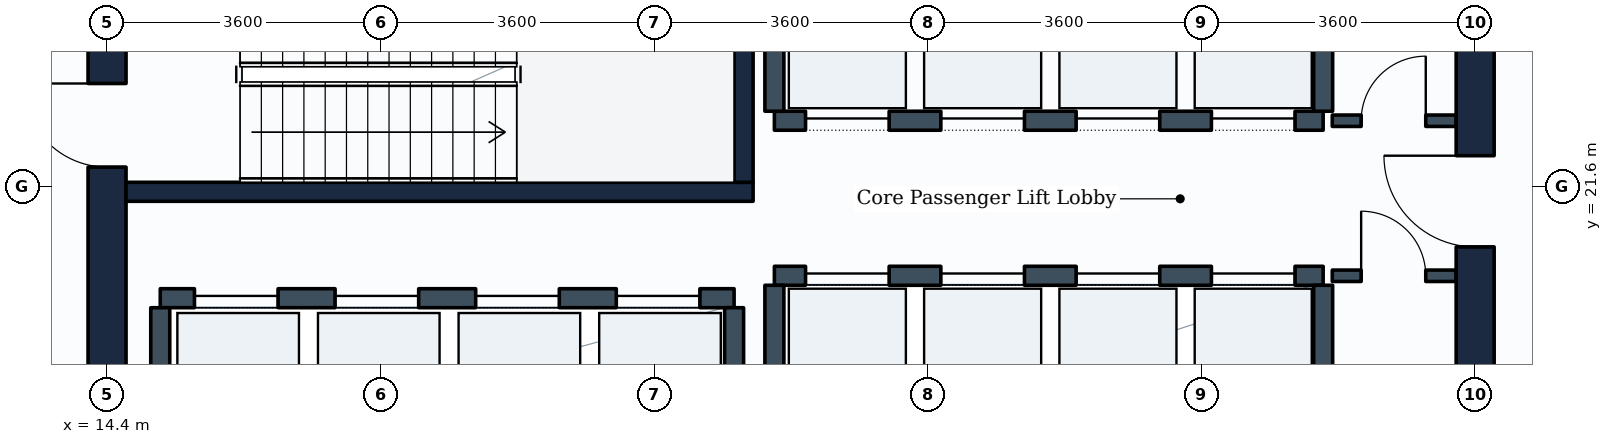
"""IFC4 building model, lengths in metres.
Left out: names, types, materials, properties, quantities, classifications, styles, units other than length and angle.
Written with IfcOpenShell. Run it as: python <this file> out.ifc"""

import sys

from ifc_helpers import new_model, si_unit, direction, frame, frame_2d, origin, place, context, subcontext, project, spatial, rectangle, extrude, element, fill, save


model = new_model("IFC4")
c1 = context("Model", 3, precision=1e-05, world=origin(), true_north=direction((0.0, 1.0)))
c2 = subcontext(c1, "Body", "Model", "MODEL_VIEW")
j1 = project(units=[si_unit("LENGTHUNIT", "METRE"), si_unit("PLANEANGLEUNIT", "RADIAN")], contexts=[c1])
p1 = place(None, origin())
s1 = spatial("IfcSite", under=j1, at=p1, CompositionType="ELEMENT")
p2 = place(p1, origin())
s2 = spatial("IfcBuilding", under=s1, at=p2, CompositionType="ELEMENT")
p3 = place(p2, frame((0.0, 0.0, 115.2)))
s3 = spatial("IfcBuildingStorey", under=s2, at=p3, CompositionType="ELEMENT", Elevation=115.2)
p4 = place(p3, frame((14.4, 10.8, 0.0), z_axis=(0.0, 0.0, 1.0), x_axis=(0.0, 1.0, 0.0)))
e1 = element("IfcWall", 1, at=p4, inside=s3, PredefinedType="SHEAR", context=c2, shape_type="SweptSolid", body=[
    extrude(rectangle(XDim=14.4, YDim=0.5, at=frame_2d((7.2, 0.0))), origin(), (0.0, 0.0, 1.0), 4.55),
])
p5 = place(p4, frame((11.05, 0.0, 0.0)))
e2 = element("IfcOpeningElement", 2, at=p5, cuts=e1, PredefinedType="OPENING", context=c2, shape_type="SweptSolid", body=[
    extrude(rectangle(XDim=1.1, YDim=2.1, at=frame_2d((0.55, 1.05))), frame((0.0, 0.26, 0.0), z_axis=(0.0, -1.0, 0.0), x_axis=(1.0, 0.0, 0.0)), (0.0, 0.0, 1.0), 0.52),
])
p6 = place(p4, frame((4.9, 0.0, 0.0)))
e3 = element("IfcOpeningElement", 3, at=p6, cuts=e1, PredefinedType="OPENING", context=c2, shape_type="SweptSolid", body=[
    extrude(rectangle(XDim=1.2, YDim=2.1, at=frame_2d((0.6, 1.05))), frame((0.0, 0.26, 0.0), z_axis=(0.0, -1.0, 0.0), x_axis=(1.0, 0.0, 0.0)), (0.0, 0.0, 1.0), 0.52),
])
p7 = place(p3, frame((32.4, 10.8, 0.0), z_axis=(0.0, 0.0, 1.0), x_axis=(0.0, 1.0, 0.0)))
e4 = element("IfcWall", 4, at=p7, inside=s3, PredefinedType="SHEAR", context=c2, shape_type="SweptSolid", body=[
    extrude(rectangle(XDim=14.4, YDim=0.5, at=frame_2d((7.2, 0.0))), origin(), (0.0, 0.0, 1.0), 4.55),
])
p8 = place(p7, frame((4.35, 0.0, 0.0)))
e5 = element("IfcOpeningElement", 5, at=p8, cuts=e4, PredefinedType="OPENING", context=c2, shape_type="SweptSolid", body=[
    extrude(rectangle(XDim=1.2, YDim=2.1, at=frame_2d((0.6, 1.05))), frame((0.0, 0.26, 0.0), z_axis=(0.0, -1.0, 0.0), x_axis=(1.0, 0.0, 0.0)), (0.0, 0.0, 1.0), 0.52),
])
p9 = place(p7, frame((10.0, 0.0, 0.0)))
e6 = element("IfcOpeningElement", 6, at=p9, cuts=e4, PredefinedType="OPENING", context=c2, shape_type="SweptSolid", body=[
    extrude(rectangle(XDim=1.2, YDim=2.1, at=frame_2d((0.6, 1.05))), frame((0.0, 0.26, 0.0), z_axis=(0.0, -1.0, 0.0), x_axis=(1.0, 0.0, 0.0)), (0.0, 0.0, 1.0), 0.52),
])
p10 = place(p3, frame((14.65, 21.525, 0.0), z_axis=(0.0, 0.0, 1.0), x_axis=(1.0, 0.0, 0.0)))
e7 = element("IfcWall", 7, at=p10, inside=s3, PredefinedType="SHEAR", context=c2, shape_type="SweptSolid", body=[
    extrude(rectangle(XDim=8.25, YDim=0.25, at=frame_2d((4.125, 0.0))), origin(), (0.0, 0.0, 1.0), 4.55),
])
p11 = place(p3, frame((22.775, 21.65, 0.0), z_axis=(0.0, 0.0, 1.0), x_axis=(0.0, 1.0, 0.0)))
e8 = element("IfcWall", 8, at=p11, inside=s3, PredefinedType="SHEAR", context=c2, shape_type="SweptSolid", body=[
    extrude(rectangle(XDim=2.84, YDim=0.25, at=frame_2d((1.42, 0.0))), origin(), (0.0, 0.0, 1.0), 4.55),
])
p12 = place(p3, frame((15.1, 20.125, 0.0), z_axis=(0.0, 0.0, 1.0), x_axis=(1.0, 0.0, 0.0)))
e9 = element("IfcWall", 9, at=p12, inside=s3, PredefinedType="PARTITIONING", context=c2, shape_type="SweptSolid", body=[
    extrude(rectangle(XDim=7.55, YDim=0.25, at=frame_2d((3.775, 0.0))), origin(), (0.0, 0.0, 1.0), 4.535),
])
p13 = place(p12, frame((0.45, 0.0, 0.0)))
e10 = element("IfcOpeningElement", 10, at=p13, cuts=e9, PredefinedType="OPENING", context=c2, shape_type="SweptSolid", body=[
    extrude(rectangle(XDim=1.1, YDim=2.1, at=frame_2d((0.55, 1.05))), frame((0.0, 0.135, 0.0), z_axis=(0.0, -1.0, 0.0), x_axis=(1.0, 0.0, 0.0)), (0.0, 0.0, 1.0), 0.27),
])
p14 = place(p12, frame((2.3, 0.0, 0.0)))
e11 = element("IfcOpeningElement", 11, at=p14, cuts=e9, PredefinedType="OPENING", context=c2, shape_type="SweptSolid", body=[
    extrude(rectangle(XDim=1.1, YDim=2.1, at=frame_2d((0.55, 1.05))), frame((0.0, 0.135, 0.0), z_axis=(0.0, -1.0, 0.0), x_axis=(1.0, 0.0, 0.0)), (0.0, 0.0, 1.0), 0.27),
])
p15 = place(p12, frame((4.15, 0.0, 0.0)))
e12 = element("IfcOpeningElement", 12, at=p15, cuts=e9, PredefinedType="OPENING", context=c2, shape_type="SweptSolid", body=[
    extrude(rectangle(XDim=1.1, YDim=2.1, at=frame_2d((0.55, 1.05))), frame((0.0, 0.135, 0.0), z_axis=(0.0, -1.0, 0.0), x_axis=(1.0, 0.0, 0.0)), (0.0, 0.0, 1.0), 0.27),
])
p16 = place(p12, frame((6.0, 0.0, 0.0)))
e13 = element("IfcOpeningElement", 13, at=p16, cuts=e9, PredefinedType="OPENING", context=c2, shape_type="SweptSolid", body=[
    extrude(rectangle(XDim=1.1, YDim=2.1, at=frame_2d((0.55, 1.05))), frame((0.0, 0.135, 0.0), z_axis=(0.0, -1.0, 0.0), x_axis=(1.0, 0.0, 0.0)), (0.0, 0.0, 1.0), 0.27),
])
for number, where, z_axis, x_axis in (
    (14, (15.1, 18.025, 0.0), (0.0, 0.0, 1.0), (0.0, 1.0, 0.0)),
    (15, (22.65, 18.025, 0.0), (0.0, 0.0, 1.0), (0.0, 1.0, 0.0)),
):
    element("IfcWall", number, at=place(p3, frame(where, z_axis=z_axis, x_axis=x_axis)), inside=s3, PredefinedType="PARTITIONING", context=c2, shape_type="SweptSolid", body=[
        extrude(rectangle(XDim=1.975, YDim=0.25, at=frame_2d((0.988, 0.0))), origin(), (0.0, 0.0, 1.0), 4.535),
    ])
p17 = place(p3, frame((23.18, 20.42, 0.0), z_axis=(0.0, 0.0, 1.0), x_axis=(1.0, 0.0, 0.0)))
e16 = element("IfcWall", 16, at=p17, inside=s3, PredefinedType="PARTITIONING", context=c2, shape_type="SweptSolid", body=[
    extrude(rectangle(XDim=7.22, YDim=0.25, at=frame_2d((3.61, 0.0))), origin(), (0.0, 0.0, 1.0), 4.535),
])
p18 = place(p17, frame((0.41, 0.0, 0.0)))
e17 = element("IfcOpeningElement", 17, at=p18, cuts=e16, PredefinedType="OPENING", context=c2, shape_type="SweptSolid", body=[
    extrude(rectangle(XDim=1.1, YDim=2.1, at=frame_2d((0.55, 1.05))), frame((0.0, 0.135, 0.0), z_axis=(0.0, -1.0, 0.0), x_axis=(1.0, 0.0, 0.0)), (0.0, 0.0, 1.0), 0.27),
])
p19 = place(p17, frame((2.19, 0.0, 0.0)))
e18 = element("IfcOpeningElement", 18, at=p19, cuts=e16, PredefinedType="OPENING", context=c2, shape_type="SweptSolid", body=[
    extrude(rectangle(XDim=1.1, YDim=2.1, at=frame_2d((0.55, 1.05))), frame((0.0, 0.135, 0.0), z_axis=(0.0, -1.0, 0.0), x_axis=(1.0, 0.0, 0.0)), (0.0, 0.0, 1.0), 0.27),
])
p20 = place(p17, frame((3.97, 0.0, 0.0)))
e19 = element("IfcOpeningElement", 19, at=p20, cuts=e16, PredefinedType="OPENING", context=c2, shape_type="SweptSolid", body=[
    extrude(rectangle(XDim=1.1, YDim=2.1, at=frame_2d((0.55, 1.05))), frame((0.0, 0.135, 0.0), z_axis=(0.0, -1.0, 0.0), x_axis=(1.0, 0.0, 0.0)), (0.0, 0.0, 1.0), 0.27),
])
p21 = place(p17, frame((5.75, 0.0, 0.0)))
e20 = element("IfcOpeningElement", 20, at=p21, cuts=e16, PredefinedType="OPENING", context=c2, shape_type="SweptSolid", body=[
    extrude(rectangle(XDim=1.1, YDim=2.1, at=frame_2d((0.55, 1.05))), frame((0.0, 0.135, 0.0), z_axis=(0.0, -1.0, 0.0), x_axis=(1.0, 0.0, 0.0)), (0.0, 0.0, 1.0), 0.27),
])
for number, where, z_axis, x_axis in (
    (21, (23.18, 18.025, 0.0), (0.0, 0.0, 1.0), (0.0, 1.0, 0.0)),
    (22, (30.4, 18.025, 0.0), (0.0, 0.0, 1.0), (0.0, 1.0, 0.0)),
):
    element("IfcWall", number, at=place(p3, frame(where, z_axis=z_axis, x_axis=x_axis)), inside=s3, PredefinedType="PARTITIONING", context=c2, shape_type="SweptSolid", body=[
        extrude(rectangle(XDim=2.27, YDim=0.25, at=frame_2d((1.135, 0.0))), origin(), (0.0, 0.0, 1.0), 4.535),
    ])
p22 = place(p3, frame((23.18, 22.46, 0.0), z_axis=(0.0, 0.0, 1.0), x_axis=(1.0, 0.0, 0.0)))
e23 = element("IfcWall", 23, at=p22, inside=s3, PredefinedType="PARTITIONING", context=c2, shape_type="SweptSolid", body=[
    extrude(rectangle(XDim=7.22, YDim=0.25, at=frame_2d((3.61, 0.0))), origin(), (0.0, 0.0, 1.0), 4.535),
])
p23 = place(p22, frame((0.41, 0.0, 0.0)))
e24 = element("IfcOpeningElement", 24, at=p23, cuts=e23, PredefinedType="OPENING", context=c2, shape_type="SweptSolid", body=[
    extrude(rectangle(XDim=1.1, YDim=2.1, at=frame_2d((0.55, 1.05))), frame((0.0, 0.135, 0.0), z_axis=(0.0, -1.0, 0.0), x_axis=(1.0, 0.0, 0.0)), (0.0, 0.0, 1.0), 0.27),
])
p24 = place(p22, frame((2.19, 0.0, 0.0)))
e25 = element("IfcOpeningElement", 25, at=p24, cuts=e23, PredefinedType="OPENING", context=c2, shape_type="SweptSolid", body=[
    extrude(rectangle(XDim=1.1, YDim=2.1, at=frame_2d((0.55, 1.05))), frame((0.0, 0.135, 0.0), z_axis=(0.0, -1.0, 0.0), x_axis=(1.0, 0.0, 0.0)), (0.0, 0.0, 1.0), 0.27),
])
p25 = place(p22, frame((3.97, 0.0, 0.0)))
e26 = element("IfcOpeningElement", 26, at=p25, cuts=e23, PredefinedType="OPENING", context=c2, shape_type="SweptSolid", body=[
    extrude(rectangle(XDim=1.1, YDim=2.1, at=frame_2d((0.55, 1.05))), frame((0.0, 0.135, 0.0), z_axis=(0.0, -1.0, 0.0), x_axis=(1.0, 0.0, 0.0)), (0.0, 0.0, 1.0), 0.27),
])
p26 = place(p22, frame((5.75, 0.0, 0.0)))
e27 = element("IfcOpeningElement", 27, at=p26, cuts=e23, PredefinedType="OPENING", context=c2, shape_type="SweptSolid", body=[
    extrude(rectangle(XDim=1.1, YDim=2.1, at=frame_2d((0.55, 1.05))), frame((0.0, 0.135, 0.0), z_axis=(0.0, -1.0, 0.0), x_axis=(1.0, 0.0, 0.0)), (0.0, 0.0, 1.0), 0.27),
])
for number, where, z_axis, x_axis in (
    (28, (23.18, 22.585, 0.0), (0.0, 0.0, 1.0), (0.0, 1.0, 0.0)),
    (29, (30.4, 22.585, 0.0), (0.0, 0.0, 1.0), (0.0, 1.0, 0.0)),
):
    element("IfcWall", number, at=place(p3, frame(where, z_axis=z_axis, x_axis=x_axis)), inside=s3, PredefinedType="PARTITIONING", context=c2, shape_type="SweptSolid", body=[
        extrude(rectangle(XDim=2.315, YDim=0.25, at=frame_2d((1.157, 0.0))), origin(), (0.0, 0.0, 1.0), 4.535),
    ])
p27 = place(p3, frame((30.52, 22.46, 0.0), z_axis=(0.0, 0.0, 1.0), x_axis=(1.0, 0.0, 0.0)))
e30 = element("IfcWall", 30, at=p27, inside=s3, PredefinedType="PARTITIONING", context=c2, shape_type="SweptSolid", body=[
    extrude(rectangle(XDim=1.63, YDim=0.15, at=frame_2d((0.815, 0.0))), origin(), (0.0, 0.0, 1.0), 4.535),
])
p28 = place(p27, frame((0.38, 0.0, 0.0)))
e31 = element("IfcOpeningElement", 31, at=p28, cuts=e30, PredefinedType="OPENING", context=c2, shape_type="SweptSolid", body=[
    extrude(rectangle(XDim=0.85, YDim=2.1, at=frame_2d((0.425, 1.05))), frame((0.0, 0.085, 0.0), z_axis=(0.0, -1.0, 0.0), x_axis=(1.0, 0.0, 0.0)), (0.0, 0.0, 1.0), 0.17),
])
p29 = place(p3, frame((30.52, 20.42, 0.0), z_axis=(0.0, 0.0, 1.0), x_axis=(1.0, 0.0, 0.0)))
e32 = element("IfcWall", 32, at=p29, inside=s3, PredefinedType="PARTITIONING", context=c2, shape_type="SweptSolid", body=[
    extrude(rectangle(XDim=1.63, YDim=0.15, at=frame_2d((0.815, 0.0))), origin(), (0.0, 0.0, 1.0), 4.535),
])
p30 = place(p29, frame((0.38, 0.0, 0.0)))
e33 = element("IfcOpeningElement", 33, at=p30, cuts=e32, PredefinedType="OPENING", context=c2, shape_type="SweptSolid", body=[
    extrude(rectangle(XDim=0.85, YDim=2.1, at=frame_2d((0.425, 1.05))), frame((0.0, 0.085, 0.0), z_axis=(0.0, -1.0, 0.0), x_axis=(1.0, 0.0, 0.0)), (0.0, 0.0, 1.0), 0.17),
])
p31 = place(p5, origin())
e34 = element("IfcDoor", 34, at=p31, inside=s3, OperationType="SINGLE_SWING_RIGHT", PredefinedType="DOOR", context=c2, shape_type="SweptSolid", body=[
    extrude(rectangle(XDim=1.1, YDim=2.1, at=frame_2d((0.55, 1.05))), frame((0.0, 0.025, 0.0), z_axis=(0.0, -1.0, 0.0), x_axis=(1.0, 0.0, 0.0)), (0.0, 0.0, 1.0), 0.05),
])
fill(e2, e34)
p32 = place(p13, origin())
e35 = element("IfcDoor", 35, at=p32, inside=s3, OperationType="SLIDING_TO_LEFT", PredefinedType="DOOR", context=c2, shape_type="SweptSolid", body=[
    extrude(rectangle(XDim=1.1, YDim=2.1, at=frame_2d((0.55, 1.05))), frame((0.0, 0.025, 0.0), z_axis=(0.0, -1.0, 0.0), x_axis=(1.0, 0.0, 0.0)), (0.0, 0.0, 1.0), 0.05),
])
fill(e10, e35)
p33 = place(p14, origin())
e36 = element("IfcDoor", 36, at=p33, inside=s3, OperationType="SLIDING_TO_LEFT", PredefinedType="DOOR", context=c2, shape_type="SweptSolid", body=[
    extrude(rectangle(XDim=1.1, YDim=2.1, at=frame_2d((0.55, 1.05))), frame((0.0, 0.025, 0.0), z_axis=(0.0, -1.0, 0.0), x_axis=(1.0, 0.0, 0.0)), (0.0, 0.0, 1.0), 0.05),
])
fill(e11, e36)
p34 = place(p15, origin())
e37 = element("IfcDoor", 37, at=p34, inside=s3, OperationType="SLIDING_TO_LEFT", PredefinedType="DOOR", context=c2, shape_type="SweptSolid", body=[
    extrude(rectangle(XDim=1.1, YDim=2.1, at=frame_2d((0.55, 1.05))), frame((0.0, 0.025, 0.0), z_axis=(0.0, -1.0, 0.0), x_axis=(1.0, 0.0, 0.0)), (0.0, 0.0, 1.0), 0.05),
])
fill(e12, e37)
p35 = place(p16, origin())
e38 = element("IfcDoor", 38, at=p35, inside=s3, OperationType="SLIDING_TO_LEFT", PredefinedType="DOOR", context=c2, shape_type="SweptSolid", body=[
    extrude(rectangle(XDim=1.1, YDim=2.1, at=frame_2d((0.55, 1.05))), frame((0.0, 0.025, 0.0), z_axis=(0.0, -1.0, 0.0), x_axis=(1.0, 0.0, 0.0)), (0.0, 0.0, 1.0), 0.05),
])
fill(e13, e38)
p36 = place(p18, origin())
e39 = element("IfcDoor", 39, at=p36, inside=s3, OperationType="SLIDING_TO_LEFT", PredefinedType="DOOR", context=c2, shape_type="SweptSolid", body=[
    extrude(rectangle(XDim=1.1, YDim=2.1, at=frame_2d((0.55, 1.05))), frame((0.0, 0.025, 0.0), z_axis=(0.0, -1.0, 0.0), x_axis=(1.0, 0.0, 0.0)), (0.0, 0.0, 1.0), 0.05),
])
fill(e17, e39)
p37 = place(p19, origin())
e40 = element("IfcDoor", 40, at=p37, inside=s3, OperationType="SLIDING_TO_LEFT", PredefinedType="DOOR", context=c2, shape_type="SweptSolid", body=[
    extrude(rectangle(XDim=1.1, YDim=2.1, at=frame_2d((0.55, 1.05))), frame((0.0, 0.025, 0.0), z_axis=(0.0, -1.0, 0.0), x_axis=(1.0, 0.0, 0.0)), (0.0, 0.0, 1.0), 0.05),
])
fill(e18, e40)
p38 = place(p20, origin())
e41 = element("IfcDoor", 41, at=p38, inside=s3, OperationType="SLIDING_TO_LEFT", PredefinedType="DOOR", context=c2, shape_type="SweptSolid", body=[
    extrude(rectangle(XDim=1.1, YDim=2.1, at=frame_2d((0.55, 1.05))), frame((0.0, 0.025, 0.0), z_axis=(0.0, -1.0, 0.0), x_axis=(1.0, 0.0, 0.0)), (0.0, 0.0, 1.0), 0.05),
])
fill(e19, e41)
p39 = place(p21, origin())
e42 = element("IfcDoor", 42, at=p39, inside=s3, OperationType="SLIDING_TO_LEFT", PredefinedType="DOOR", context=c2, shape_type="SweptSolid", body=[
    extrude(rectangle(XDim=1.1, YDim=2.1, at=frame_2d((0.55, 1.05))), frame((0.0, 0.025, 0.0), z_axis=(0.0, -1.0, 0.0), x_axis=(1.0, 0.0, 0.0)), (0.0, 0.0, 1.0), 0.05),
])
fill(e20, e42)
p40 = place(p23, origin())
e43 = element("IfcDoor", 43, at=p40, inside=s3, OperationType="SLIDING_TO_LEFT", PredefinedType="DOOR", context=c2, shape_type="SweptSolid", body=[
    extrude(rectangle(XDim=1.1, YDim=2.1, at=frame_2d((0.55, 1.05))), frame((0.0, 0.025, 0.0), z_axis=(0.0, -1.0, 0.0), x_axis=(1.0, 0.0, 0.0)), (0.0, 0.0, 1.0), 0.05),
])
fill(e24, e43)
p41 = place(p24, origin())
e44 = element("IfcDoor", 44, at=p41, inside=s3, OperationType="SLIDING_TO_LEFT", PredefinedType="DOOR", context=c2, shape_type="SweptSolid", body=[
    extrude(rectangle(XDim=1.1, YDim=2.1, at=frame_2d((0.55, 1.05))), frame((0.0, 0.025, 0.0), z_axis=(0.0, -1.0, 0.0), x_axis=(1.0, 0.0, 0.0)), (0.0, 0.0, 1.0), 0.05),
])
fill(e25, e44)
p42 = place(p25, origin())
e45 = element("IfcDoor", 45, at=p42, inside=s3, OperationType="SLIDING_TO_LEFT", PredefinedType="DOOR", context=c2, shape_type="SweptSolid", body=[
    extrude(rectangle(XDim=1.1, YDim=2.1, at=frame_2d((0.55, 1.05))), frame((0.0, 0.025, 0.0), z_axis=(0.0, -1.0, 0.0), x_axis=(1.0, 0.0, 0.0)), (0.0, 0.0, 1.0), 0.05),
])
fill(e26, e45)
p43 = place(p26, origin())
e46 = element("IfcDoor", 46, at=p43, inside=s3, OperationType="SLIDING_TO_LEFT", PredefinedType="DOOR", context=c2, shape_type="SweptSolid", body=[
    extrude(rectangle(XDim=1.1, YDim=2.1, at=frame_2d((0.55, 1.05))), frame((0.0, 0.025, 0.0), z_axis=(0.0, -1.0, 0.0), x_axis=(1.0, 0.0, 0.0)), (0.0, 0.0, 1.0), 0.05),
])
fill(e27, e46)
p44 = place(p9, origin())
e47 = element("IfcDoor", 47, at=p44, inside=s3, OperationType="SINGLE_SWING_RIGHT", PredefinedType="DOOR", context=c2, shape_type="SweptSolid", body=[
    extrude(rectangle(XDim=1.2, YDim=2.1, at=frame_2d((0.6, 1.05))), frame((0.0, 0.025, 0.0), z_axis=(0.0, -1.0, 0.0), x_axis=(1.0, 0.0, 0.0)), (0.0, 0.0, 1.0), 0.05),
])
fill(e6, e47)
p45 = place(p28, origin())
e48 = element("IfcDoor", 48, at=p45, inside=s3, OperationType="SINGLE_SWING_RIGHT", PredefinedType="DOOR", context=c2, shape_type="SweptSolid", body=[
    extrude(rectangle(XDim=0.85, YDim=2.1, at=frame_2d((0.425, 1.05))), frame((0.0, 0.025, 0.0), z_axis=(0.0, -1.0, 0.0), x_axis=(1.0, 0.0, 0.0)), (0.0, 0.0, 1.0), 0.05),
])
fill(e31, e48)
p46 = place(p30, origin())
e49 = element("IfcDoor", 49, at=p46, inside=s3, OperationType="SINGLE_SWING_LEFT", PredefinedType="DOOR", context=c2, shape_type="SweptSolid", body=[
    extrude(rectangle(XDim=0.85, YDim=2.1, at=frame_2d((0.425, 1.05))), frame((0.0, 0.025, 0.0), z_axis=(0.0, -1.0, 0.0), x_axis=(1.0, 0.0, 0.0)), (0.0, 0.0, 1.0), 0.05),
])
fill(e33, e49)
save(model, sys.argv[1])
